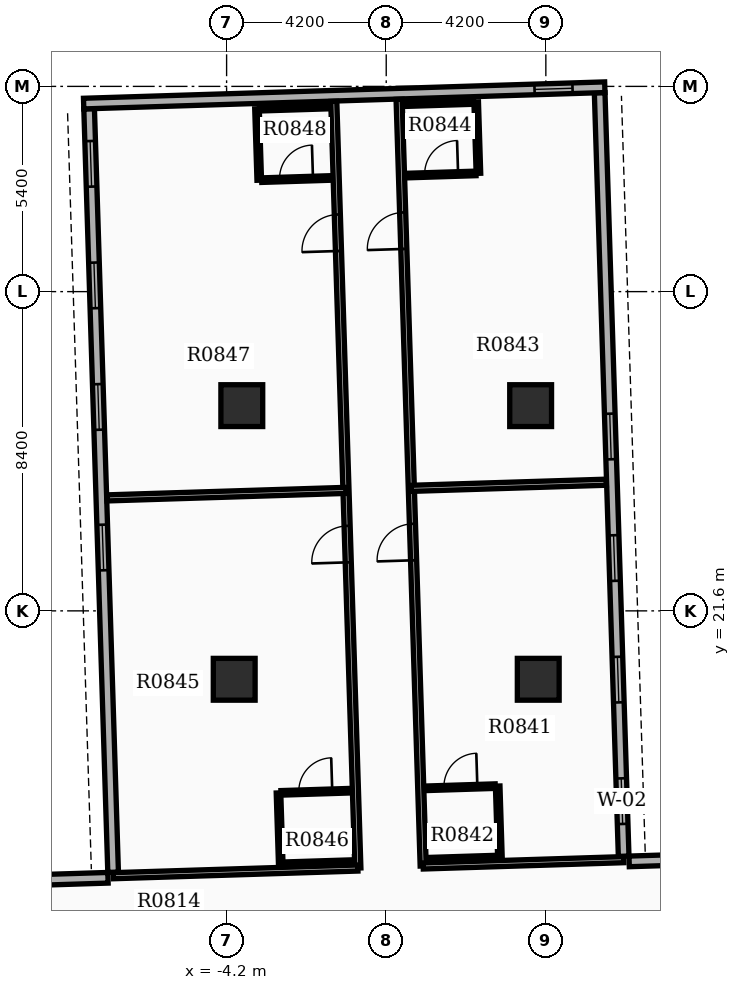
"""IFC4 building model, lengths in metres.
Left out: names, types, materials, properties, quantities, classifications, styles, units other than length and angle.
Written with IfcOpenShell. Run it as: python <this file> out.ifc"""

import sys

from ifc_helpers import new_model, si_unit, direction, frame, frame_2d, origin, origin_2d, place, context, subcontext, project, spatial, rectangle, extrude, element, fill, save


model = new_model("IFC4")
c1 = context("Model", 3, precision=1e-05, world=origin(), true_north=direction((0.0, 1.0)))
c2 = subcontext(c1, "Body", "Model", "MODEL_VIEW")
j1 = project(units=[si_unit("LENGTHUNIT", "METRE"), si_unit("PLANEANGLEUNIT", "RADIAN")], contexts=[c1])
p1 = place(None, origin())
s1 = spatial("IfcSite", under=j1, at=p1, CompositionType="ELEMENT")
p2 = place(p1, origin())
s2 = spatial("IfcBuilding", under=s1, at=p2, CompositionType="ELEMENT")
p3 = place(p2, frame((0.0, 0.0, 56.1)))
s3 = spatial("IfcBuildingStorey", under=s2, at=p3, CompositionType="ELEMENT", Elevation=56.1)
for number, where, z_axis, x_axis in (
    (1, (-4.0, 19.8, 0.0), (0.0, 0.0, 1.0), (1.0, 0.0, 0.0)),
    (2, (4.0, 19.8, 0.0), (0.0, 0.0, 1.0), (1.0, 0.0, 0.0)),
    (3, (-3.8, 27.0, 0.0), (0.0, 0.0, 1.0), (1.0, 0.0, 0.0)),
    (4, (3.8, 27.0, 0.0), (0.0, 0.0, 1.0), (1.0, 0.0, 0.0)),
):
    element("IfcColumn", number, at=place(p3, frame(where, z_axis=z_axis, x_axis=x_axis)), inside=s3, PredefinedType="COLUMN", context=c2, shape_type="SweptSolid", body=[
        extrude(rectangle(XDim=1.1, YDim=1.1, at=origin_2d()), origin(), (0.0, 0.0, 1.0), 3.9),
    ])
p4 = place(p3, frame((6.247, 15.144, 0.0), z_axis=(0.0, 0.0, 1.0), x_axis=(-0.031398187845, 0.999506955354, 0.0)))
e5 = element("IfcWall", 5, at=p4, inside=s3, PredefinedType="STANDARD", context=c2, shape_type="SweptSolid", body=[
    extrude(rectangle(XDim=20.1, YDim=0.28, at=frame_2d((10.05, 0.0))), origin(), (0.0, 0.0, 1.0), 2.91),
])
p5 = place(p4, frame((0.85, 0.0, 0.8)))
e6 = element("IfcOpeningElement", 6, at=p5, cuts=e5, PredefinedType="OPENING", context=c2, shape_type="SweptSolid", body=[
    extrude(rectangle(XDim=1.2, YDim=1.6, at=frame_2d((0.6, 0.8))), frame((0.0, 0.15, 0.0), z_axis=(0.0, -1.0, 0.0), x_axis=(1.0, 0.0, 0.0)), (0.0, 0.0, 1.0), 0.3),
])
p6 = place(p4, frame((4.05, 0.0, 0.8)))
e7 = element("IfcOpeningElement", 7, at=p6, cuts=e5, PredefinedType="OPENING", context=c2, shape_type="SweptSolid", body=[
    extrude(rectangle(XDim=1.2, YDim=1.6, at=frame_2d((0.6, 0.8))), frame((0.0, 0.15, 0.0), z_axis=(0.0, -1.0, 0.0), x_axis=(1.0, 0.0, 0.0)), (0.0, 0.0, 1.0), 0.3),
])
p7 = place(p4, frame((7.25, 0.0, 0.8)))
e8 = element("IfcOpeningElement", 8, at=p7, cuts=e5, PredefinedType="OPENING", context=c2, shape_type="SweptSolid", body=[
    extrude(rectangle(XDim=1.2, YDim=1.6, at=frame_2d((0.6, 0.8))), frame((0.0, 0.15, 0.0), z_axis=(0.0, -1.0, 0.0), x_axis=(1.0, 0.0, 0.0)), (0.0, 0.0, 1.0), 0.3),
])
p8 = place(p4, frame((10.45, 0.0, 0.8)))
e9 = element("IfcOpeningElement", 9, at=p8, cuts=e5, PredefinedType="OPENING", context=c2, shape_type="SweptSolid", body=[
    extrude(rectangle(XDim=1.2, YDim=1.6, at=frame_2d((0.6, 0.8))), frame((0.0, 0.15, 0.0), z_axis=(0.0, -1.0, 0.0), x_axis=(1.0, 0.0, 0.0)), (0.0, 0.0, 1.0), 0.3),
])
p9 = place(p3, frame((-7.817, 34.812, 0.0), z_axis=(0.0, 0.0, 1.0), x_axis=(0.031410322165, -0.999506574096, 0.0)))
e10 = element("IfcWall", 10, at=p9, inside=s3, PredefinedType="STANDARD", context=c2, shape_type="SweptSolid", body=[
    extrude(rectangle(XDim=20.1, YDim=0.28, at=frame_2d((10.05, 0.0))), origin(), (0.0, 0.0, 1.0), 2.91),
])
p10 = place(p9, frame((0.85, 0.0, 0.8)))
e11 = element("IfcOpeningElement", 11, at=p10, cuts=e10, PredefinedType="OPENING", context=c2, shape_type="SweptSolid", body=[
    extrude(rectangle(XDim=1.2, YDim=1.6, at=frame_2d((0.6, 0.8))), frame((0.0, 0.15, 0.0), z_axis=(0.0, -1.0, 0.0), x_axis=(1.0, 0.0, 0.0)), (0.0, 0.0, 1.0), 0.3),
])
p11 = place(p9, frame((4.05, 0.0, 0.8)))
e12 = element("IfcOpeningElement", 12, at=p11, cuts=e10, PredefinedType="OPENING", context=c2, shape_type="SweptSolid", body=[
    extrude(rectangle(XDim=1.2, YDim=1.6, at=frame_2d((0.6, 0.8))), frame((0.0, 0.15, 0.0), z_axis=(0.0, -1.0, 0.0), x_axis=(1.0, 0.0, 0.0)), (0.0, 0.0, 1.0), 0.3),
])
p12 = place(p9, frame((7.25, 0.0, 0.8)))
e13 = element("IfcOpeningElement", 13, at=p12, cuts=e10, PredefinedType="OPENING", context=c2, shape_type="SweptSolid", body=[
    extrude(rectangle(XDim=1.2, YDim=1.6, at=frame_2d((0.6, 0.8))), frame((0.0, 0.15, 0.0), z_axis=(0.0, -1.0, 0.0), x_axis=(1.0, 0.0, 0.0)), (0.0, 0.0, 1.0), 0.3),
])
p13 = place(p9, frame((10.95, 0.0, 0.8)))
e14 = element("IfcOpeningElement", 14, at=p13, cuts=e10, PredefinedType="OPENING", context=c2, shape_type="SweptSolid", body=[
    extrude(rectangle(XDim=1.2, YDim=1.6, at=frame_2d((0.6, 0.8))), frame((0.0, 0.15, 0.0), z_axis=(0.0, -1.0, 0.0), x_axis=(1.0, 0.0, 0.0)), (0.0, 0.0, 1.0), 0.3),
])
p14 = place(p3, frame((5.752, 35.378, 0.0), z_axis=(0.0, 0.0, 1.0), x_axis=(-0.999506679556, -0.031406966164, 0.0)))
e15 = element("IfcWall", 15, at=p14, inside=s3, PredefinedType="STANDARD", context=c2, shape_type="SweptSolid", body=[
    extrude(rectangle(XDim=13.72, YDim=0.28, at=frame_2d((6.86, 0.0))), origin(), (0.0, 0.0, 1.0), 2.91),
])
p15 = place(p14, frame((0.85, 0.0, 0.85)))
e16 = element("IfcOpeningElement", 16, at=p15, cuts=e15, PredefinedType="OPENING", context=c2, shape_type="SweptSolid", body=[
    extrude(rectangle(XDim=1.0, YDim=1.5, at=frame_2d((0.5, 0.75))), frame((0.0, 0.15, 0.0), z_axis=(0.0, -1.0, 0.0), x_axis=(1.0, 0.0, 0.0)), (0.0, 0.0, 1.0), 0.3),
])
p16 = place(p3, frame((12.689, 15.206, 0.0), z_axis=(0.0, 0.0, 1.0), x_axis=(-0.999507262922, -0.031388395416, 0.0)))
e17 = element("IfcWall", 17, at=p16, inside=s3, PredefinedType="STANDARD", context=c2, shape_type="SweptSolid", body=[
    extrude(rectangle(XDim=6.3, YDim=0.28, at=frame_2d((3.15, 0.0))), origin(), (0.0, 0.0, 1.0), 2.91),
])
p17 = place(p3, frame((-13.618, 14.379, 0.0), z_axis=(0.0, 0.0, 1.0), x_axis=(0.999507224741, 0.031389611199, 0.0)))
e18 = element("IfcWall", 18, at=p17, inside=s3, PredefinedType="STANDARD", context=c2, shape_type="SweptSolid", body=[
    extrude(rectangle(XDim=6.3, YDim=0.28, at=frame_2d((3.15, 0.0))), origin(), (0.0, 0.0, 1.0), 2.91),
])
p18 = place(p3, frame((0.973, 14.888, 0.0), z_axis=(0.0, 0.0, 1.0), x_axis=(-0.031416030536, 0.99950639469, 0.0)))
e19 = element("IfcWall", 19, at=p18, inside=s3, PredefinedType="PARTITIONING", context=c2, shape_type="SweptSolid", body=[
    extrude(rectangle(XDim=20.182, YDim=0.16, at=frame_2d((10.091, 0.0))), origin(), (0.0, 0.0, 1.0), 2.9),
])
p19 = place(p18, frame((8.047, 0.0, 0.0)))
e20 = element("IfcOpeningElement", 20, at=p19, cuts=e19, PredefinedType="OPENING", context=c2, shape_type="SweptSolid", body=[
    extrude(rectangle(XDim=0.96, YDim=2.15, at=frame_2d((0.48, 1.075))), frame((0.0, 0.09, 0.0), z_axis=(0.0, -1.0, 0.0), x_axis=(1.0, 0.0, 0.0)), (0.0, 0.0, 1.0), 0.18),
])
p20 = place(p18, frame((16.243, 0.0, 0.0)))
e21 = element("IfcOpeningElement", 21, at=p20, cuts=e19, PredefinedType="OPENING", context=c2, shape_type="SweptSolid", body=[
    extrude(rectangle(XDim=0.96, YDim=2.15, at=frame_2d((0.48, 1.075))), frame((0.0, 0.09, 0.0), z_axis=(0.0, -1.0, 0.0), x_axis=(1.0, 0.0, 0.0)), (0.0, 0.0, 1.0), 0.18),
])
p21 = place(p3, frame((0.973, 14.888, 0.0), z_axis=(0.0, 0.0, 1.0), x_axis=(0.99950701053, 0.031396431354, 0.0)))
e22 = element("IfcWall", 22, at=p21, inside=s3, PredefinedType="PARTITIONING", context=c2, shape_type="SweptSolid", body=[
    extrude(rectangle(XDim=5.28, YDim=0.16, at=frame_2d((2.64, 0.0))), origin(), (0.0, 0.0, 1.0), 2.9),
])
p22 = place(p3, frame((0.661, 24.824, 0.0), z_axis=(0.0, 0.0, 1.0), x_axis=(0.999506957349, 0.031398124315, 0.0)))
e23 = element("IfcWall", 23, at=p22, inside=s3, PredefinedType="PARTITIONING", context=c2, shape_type="SweptSolid", body=[
    extrude(rectangle(XDim=5.132, YDim=0.16, at=frame_2d((2.566, 0.0))), origin(), (0.0, 0.0, 1.0), 2.9),
])
p23 = place(p3, frame((1.049, 16.931, 0.0), z_axis=(0.0, 0.0, 1.0), x_axis=(0.999507353951, 0.031385496622, 0.0)))
e24 = element("IfcWall", 24, at=p23, inside=s3, PredefinedType="PARTITIONING", context=c2, shape_type="SweptSolid", body=[
    extrude(rectangle(XDim=1.82, YDim=0.12, at=frame_2d((0.91, 0.0))), origin(), (0.0, 0.0, 1.0), 2.9),
])
p24 = place(p23, frame((0.47, 0.0, 0.0)))
e25 = element("IfcOpeningElement", 25, at=p24, cuts=e24, PredefinedType="OPENING", context=c2, shape_type="SweptSolid", body=[
    extrude(rectangle(XDim=0.88, YDim=2.1, at=frame_2d((0.44, 1.05))), frame((0.0, 0.07, 0.0), z_axis=(0.0, -1.0, 0.0), x_axis=(1.0, 0.0, 0.0)), (0.0, 0.0, 1.0), 0.14),
])
p25 = place(p3, frame((1.108, 15.052, 0.0), z_axis=(0.0, 0.0, 1.0), x_axis=(0.999507221803, 0.031389704724, 0.0)))
e26 = element("IfcWall", 26, at=p25, inside=s3, PredefinedType="PARTITIONING", context=c2, shape_type="SweptSolid", body=[
    extrude(rectangle(XDim=1.82, YDim=0.12, at=frame_2d((0.91, 0.0))), origin(), (0.0, 0.0, 1.0), 2.9),
])
p26 = place(p3, frame((2.992, 15.111, 0.0), z_axis=(0.0, 0.0, 1.0), x_axis=(-0.031295563454, 0.999510173889, 0.0)))
e27 = element("IfcWall", 27, at=p26, inside=s3, PredefinedType="PARTITIONING", context=c2, shape_type="SweptSolid", body=[
    extrude(rectangle(XDim=1.88, YDim=0.12, at=frame_2d((0.94, 0.0))), origin(), (0.0, 0.0, 1.0), 2.9),
])
p27 = place(p3, frame((0.542, 33.053, 0.0), z_axis=(0.0, 0.0, 1.0), x_axis=(0.999503004171, 0.03152371574, 0.0)))
e28 = element("IfcWall", 28, at=p27, inside=s3, PredefinedType="PARTITIONING", context=c2, shape_type="SweptSolid", body=[
    extrude(rectangle(XDim=1.82, YDim=0.12, at=frame_2d((0.91, 0.0))), origin(), (0.0, 0.0, 1.0), 2.9),
])
p28 = place(p27, frame((0.47, 0.0, 0.0)))
e29 = element("IfcOpeningElement", 29, at=p28, cuts=e28, PredefinedType="OPENING", context=c2, shape_type="SweptSolid", body=[
    extrude(rectangle(XDim=0.88, YDim=2.1, at=frame_2d((0.44, 1.05))), frame((0.0, 0.07, 0.0), z_axis=(0.0, -1.0, 0.0), x_axis=(1.0, 0.0, 0.0)), (0.0, 0.0, 1.0), 0.14),
])
p29 = place(p3, frame((0.483, 34.932, 0.0), z_axis=(0.0, 0.0, 1.0), x_axis=(0.999507221803, 0.031389704724, 0.0)))
e30 = element("IfcWall", 30, at=p29, inside=s3, PredefinedType="PARTITIONING", context=c2, shape_type="SweptSolid", body=[
    extrude(rectangle(XDim=1.82, YDim=0.12, at=frame_2d((0.91, 0.0))), origin(), (0.0, 0.0, 1.0), 2.9),
])
p30 = place(p3, frame((2.426, 33.113, 0.0), z_axis=(0.0, 0.0, 1.0), x_axis=(-0.031295563454, 0.999510173889, 0.0)))
e31 = element("IfcWall", 31, at=p30, inside=s3, PredefinedType="PARTITIONING", context=c2, shape_type="SweptSolid", body=[
    extrude(rectangle(XDim=1.88, YDim=0.12, at=frame_2d((0.94, 0.0))), origin(), (0.0, 0.0, 1.0), 2.9),
])
p31 = place(p3, frame((-0.746, 14.834, 0.0), z_axis=(0.0, 0.0, 1.0), x_axis=(-0.031416030536, 0.99950639469, 0.0)))
e32 = element("IfcWall", 32, at=p31, inside=s3, PredefinedType="PARTITIONING", context=c2, shape_type="SweptSolid", body=[
    extrude(rectangle(XDim=20.182, YDim=0.16, at=frame_2d((10.091, 0.0))), origin(), (0.0, 0.0, 1.0), 2.9),
])
p32 = place(p31, frame((8.047, 0.0, 0.0)))
e33 = element("IfcOpeningElement", 33, at=p32, cuts=e32, PredefinedType="OPENING", context=c2, shape_type="SweptSolid", body=[
    extrude(rectangle(XDim=0.96, YDim=2.15, at=frame_2d((0.48, 1.075))), frame((0.0, 0.09, 0.0), z_axis=(0.0, -1.0, 0.0), x_axis=(1.0, 0.0, 0.0)), (0.0, 0.0, 1.0), 0.18),
])
p33 = place(p31, frame((16.243, 0.0, 0.0)))
e34 = element("IfcOpeningElement", 34, at=p33, cuts=e32, PredefinedType="OPENING", context=c2, shape_type="SweptSolid", body=[
    extrude(rectangle(XDim=0.96, YDim=2.15, at=frame_2d((0.48, 1.075))), frame((0.0, 0.09, 0.0), z_axis=(0.0, -1.0, 0.0), x_axis=(1.0, 0.0, 0.0)), (0.0, 0.0, 1.0), 0.18),
])
p34 = place(p3, frame((-0.746, 14.834, 0.0), z_axis=(0.0, 0.0, 1.0), x_axis=(-0.999506028801, -0.031427669178, 0.0)))
e35 = element("IfcWall", 35, at=p34, inside=s3, PredefinedType="PARTITIONING", context=c2, shape_type="SweptSolid", body=[
    extrude(rectangle(XDim=6.44, YDim=0.16, at=frame_2d((3.22, 0.0))), origin(), (0.0, 0.0, 1.0), 2.9),
])
p35 = place(p3, frame((-1.059, 24.77, 0.0), z_axis=(0.0, 0.0, 1.0), x_axis=(-0.999505962274, -0.031429784908, 0.0)))
e36 = element("IfcWall", 36, at=p35, inside=s3, PredefinedType="PARTITIONING", context=c2, shape_type="SweptSolid", body=[
    extrude(rectangle(XDim=6.292, YDim=0.16, at=frame_2d((3.146, 0.0))), origin(), (0.0, 0.0, 1.0), 2.9),
])
p36 = place(p3, frame((-2.769, 16.811, 0.0), z_axis=(0.0, 0.0, 1.0), x_axis=(0.999507221803, 0.031389704724, 0.0)))
e37 = element("IfcWall", 37, at=p36, inside=s3, PredefinedType="PARTITIONING", context=c2, shape_type="SweptSolid", body=[
    extrude(rectangle(XDim=1.82, YDim=0.12, at=frame_2d((0.91, 0.0))), origin(), (0.0, 0.0, 1.0), 2.9),
])
p37 = place(p36, frame((0.47, 0.0, 0.0)))
e38 = element("IfcOpeningElement", 38, at=p37, cuts=e37, PredefinedType="OPENING", context=c2, shape_type="SweptSolid", body=[
    extrude(rectangle(XDim=0.88, YDim=2.1, at=frame_2d((0.44, 1.05))), frame((0.0, 0.07, 0.0), z_axis=(0.0, -1.0, 0.0), x_axis=(1.0, 0.0, 0.0)), (0.0, 0.0, 1.0), 0.14),
])
p38 = place(p3, frame((-2.71, 14.932, 0.0), z_axis=(0.0, 0.0, 1.0), x_axis=(0.999503004171, 0.03152371574, 0.0)))
e39 = element("IfcWall", 39, at=p38, inside=s3, PredefinedType="PARTITIONING", context=c2, shape_type="SweptSolid", body=[
    extrude(rectangle(XDim=1.82, YDim=0.12, at=frame_2d((0.91, 0.0))), origin(), (0.0, 0.0, 1.0), 2.9),
])
p39 = place(p3, frame((-2.775, 14.93, 0.0), z_axis=(0.0, 0.0, 1.0), x_axis=(-0.031425292588, 0.999506103526, 0.0)))
e40 = element("IfcWall", 40, at=p39, inside=s3, PredefinedType="PARTITIONING", context=c2, shape_type="SweptSolid", body=[
    extrude(rectangle(XDim=1.88, YDim=0.12, at=frame_2d((0.94, 0.0))), origin(), (0.0, 0.0, 1.0), 2.9),
])
p40 = place(p3, frame((-3.276, 32.933, 0.0), z_axis=(0.0, 0.0, 1.0), x_axis=(0.999507221803, 0.031389704724, 0.0)))
e41 = element("IfcWall", 41, at=p40, inside=s3, PredefinedType="PARTITIONING", context=c2, shape_type="SweptSolid", body=[
    extrude(rectangle(XDim=1.82, YDim=0.12, at=frame_2d((0.91, 0.0))), origin(), (0.0, 0.0, 1.0), 2.9),
])
p41 = place(p40, frame((0.47, 0.0, 0.0)))
e42 = element("IfcOpeningElement", 42, at=p41, cuts=e41, PredefinedType="OPENING", context=c2, shape_type="SweptSolid", body=[
    extrude(rectangle(XDim=0.88, YDim=2.1, at=frame_2d((0.44, 1.05))), frame((0.0, 0.07, 0.0), z_axis=(0.0, -1.0, 0.0), x_axis=(1.0, 0.0, 0.0)), (0.0, 0.0, 1.0), 0.14),
])
p42 = place(p3, frame((-3.335, 34.812, 0.0), z_axis=(0.0, 0.0, 1.0), x_axis=(0.999507221803, 0.031389704724, 0.0)))
e43 = element("IfcWall", 43, at=p42, inside=s3, PredefinedType="PARTITIONING", context=c2, shape_type="SweptSolid", body=[
    extrude(rectangle(XDim=1.82, YDim=0.12, at=frame_2d((0.91, 0.0))), origin(), (0.0, 0.0, 1.0), 2.9),
])
p43 = place(p3, frame((-3.341, 32.931, 0.0), z_axis=(0.0, 0.0, 1.0), x_axis=(-0.031429371883, 0.999505975261, 0.0)))
e44 = element("IfcWall", 44, at=p43, inside=s3, PredefinedType="PARTITIONING", context=c2, shape_type="SweptSolid", body=[
    extrude(rectangle(XDim=1.88, YDim=0.12, at=frame_2d((0.94, 0.0))), origin(), (0.0, 0.0, 1.0), 2.9),
])
p44 = place(p5, origin())
e45 = element("IfcWindow", 45, at=p44, inside=s3, PartitioningType="SINGLE_PANEL", PredefinedType="WINDOW", context=c2, shape_type="SweptSolid", body=[
    extrude(rectangle(XDim=1.2, YDim=1.6, at=frame_2d((0.6, 0.8))), frame((0.0, 0.03, 0.0), z_axis=(0.0, -1.0, 0.0), x_axis=(1.0, 0.0, 0.0)), (0.0, 0.0, 1.0), 0.06),
])
fill(e6, e45)
p45 = place(p6, origin())
e46 = element("IfcWindow", 46, at=p45, inside=s3, PartitioningType="SINGLE_PANEL", PredefinedType="WINDOW", context=c2, shape_type="SweptSolid", body=[
    extrude(rectangle(XDim=1.2, YDim=1.6, at=frame_2d((0.6, 0.8))), frame((0.0, 0.03, 0.0), z_axis=(0.0, -1.0, 0.0), x_axis=(1.0, 0.0, 0.0)), (0.0, 0.0, 1.0), 0.06),
])
fill(e7, e46)
p46 = place(p7, origin())
e47 = element("IfcWindow", 47, at=p46, inside=s3, PartitioningType="SINGLE_PANEL", PredefinedType="WINDOW", context=c2, shape_type="SweptSolid", body=[
    extrude(rectangle(XDim=1.2, YDim=1.6, at=frame_2d((0.6, 0.8))), frame((0.0, 0.03, 0.0), z_axis=(0.0, -1.0, 0.0), x_axis=(1.0, 0.0, 0.0)), (0.0, 0.0, 1.0), 0.06),
])
fill(e8, e47)
p47 = place(p8, origin())
e48 = element("IfcWindow", 48, at=p47, inside=s3, PartitioningType="SINGLE_PANEL", PredefinedType="WINDOW", context=c2, shape_type="SweptSolid", body=[
    extrude(rectangle(XDim=1.2, YDim=1.6, at=frame_2d((0.6, 0.8))), frame((0.0, 0.03, 0.0), z_axis=(0.0, -1.0, 0.0), x_axis=(1.0, 0.0, 0.0)), (0.0, 0.0, 1.0), 0.06),
])
fill(e9, e48)
p48 = place(p10, origin())
e49 = element("IfcWindow", 49, at=p48, inside=s3, PartitioningType="SINGLE_PANEL", PredefinedType="WINDOW", context=c2, shape_type="SweptSolid", body=[
    extrude(rectangle(XDim=1.2, YDim=1.6, at=frame_2d((0.6, 0.8))), frame((0.0, 0.03, 0.0), z_axis=(0.0, -1.0, 0.0), x_axis=(1.0, 0.0, 0.0)), (0.0, 0.0, 1.0), 0.06),
])
fill(e11, e49)
p49 = place(p11, origin())
e50 = element("IfcWindow", 50, at=p49, inside=s3, PartitioningType="SINGLE_PANEL", PredefinedType="WINDOW", context=c2, shape_type="SweptSolid", body=[
    extrude(rectangle(XDim=1.2, YDim=1.6, at=frame_2d((0.6, 0.8))), frame((0.0, 0.03, 0.0), z_axis=(0.0, -1.0, 0.0), x_axis=(1.0, 0.0, 0.0)), (0.0, 0.0, 1.0), 0.06),
])
fill(e12, e50)
p50 = place(p12, origin())
e51 = element("IfcWindow", 51, at=p50, inside=s3, PartitioningType="SINGLE_PANEL", PredefinedType="WINDOW", context=c2, shape_type="SweptSolid", body=[
    extrude(rectangle(XDim=1.2, YDim=1.6, at=frame_2d((0.6, 0.8))), frame((0.0, 0.03, 0.0), z_axis=(0.0, -1.0, 0.0), x_axis=(1.0, 0.0, 0.0)), (0.0, 0.0, 1.0), 0.06),
])
fill(e13, e51)
p51 = place(p13, origin())
e52 = element("IfcWindow", 52, at=p51, inside=s3, PartitioningType="SINGLE_PANEL", PredefinedType="WINDOW", context=c2, shape_type="SweptSolid", body=[
    extrude(rectangle(XDim=1.2, YDim=1.6, at=frame_2d((0.6, 0.8))), frame((0.0, 0.03, 0.0), z_axis=(0.0, -1.0, 0.0), x_axis=(1.0, 0.0, 0.0)), (0.0, 0.0, 1.0), 0.06),
])
fill(e14, e52)
p52 = place(p15, origin())
e53 = element("IfcWindow", 53, at=p52, inside=s3, PartitioningType="SINGLE_PANEL", PredefinedType="WINDOW", context=c2, shape_type="SweptSolid", body=[
    extrude(rectangle(XDim=1.0, YDim=1.5, at=frame_2d((0.5, 0.75))), frame((0.0, 0.03, 0.0), z_axis=(0.0, -1.0, 0.0), x_axis=(1.0, 0.0, 0.0)), (0.0, 0.0, 1.0), 0.06),
])
fill(e16, e53)
p53 = place(p19, origin())
e54 = element("IfcDoor", 54, at=p53, inside=s3, OperationType="SINGLE_SWING_LEFT", PredefinedType="DOOR", context=c2, shape_type="SweptSolid", body=[
    extrude(rectangle(XDim=0.96, YDim=2.15, at=frame_2d((0.48, 1.075))), frame((0.0, 0.025, 0.0), z_axis=(0.0, -1.0, 0.0), x_axis=(1.0, 0.0, 0.0)), (0.0, 0.0, 1.0), 0.05),
])
fill(e20, e54)
p54 = place(p24, origin())
e55 = element("IfcDoor", 55, at=p54, inside=s3, OperationType="SINGLE_SWING_RIGHT", PredefinedType="DOOR", context=c2, shape_type="SweptSolid", body=[
    extrude(rectangle(XDim=0.88, YDim=2.1, at=frame_2d((0.44, 1.05))), frame((0.0, 0.025, 0.0), z_axis=(0.0, -1.0, 0.0), x_axis=(1.0, 0.0, 0.0)), (0.0, 0.0, 1.0), 0.05),
])
fill(e25, e55)
p55 = place(p20, origin())
e56 = element("IfcDoor", 56, at=p55, inside=s3, OperationType="SINGLE_SWING_LEFT", PredefinedType="DOOR", context=c2, shape_type="SweptSolid", body=[
    extrude(rectangle(XDim=0.96, YDim=2.15, at=frame_2d((0.48, 1.075))), frame((0.0, 0.025, 0.0), z_axis=(0.0, -1.0, 0.0), x_axis=(1.0, 0.0, 0.0)), (0.0, 0.0, 1.0), 0.05),
])
fill(e21, e56)
p56 = place(p28, origin())
e57 = element("IfcDoor", 57, at=p56, inside=s3, OperationType="SINGLE_SWING_RIGHT", PredefinedType="DOOR", context=c2, shape_type="SweptSolid", body=[
    extrude(rectangle(XDim=0.88, YDim=2.1, at=frame_2d((0.44, 1.05))), frame((0.0, 0.025, 0.0), z_axis=(0.0, -1.0, 0.0), x_axis=(1.0, 0.0, 0.0)), (0.0, 0.0, 1.0), 0.05),
])
fill(e29, e57)
p57 = place(p32, origin())
e58 = element("IfcDoor", 58, at=p57, inside=s3, OperationType="SINGLE_SWING_LEFT", PredefinedType="DOOR", context=c2, shape_type="SweptSolid", body=[
    extrude(rectangle(XDim=0.96, YDim=2.15, at=frame_2d((0.48, 1.075))), frame((0.0, 0.025, 0.0), z_axis=(0.0, -1.0, 0.0), x_axis=(1.0, 0.0, 0.0)), (0.0, 0.0, 1.0), 0.05),
])
fill(e33, e58)
p58 = place(p37, origin())
e59 = element("IfcDoor", 59, at=p58, inside=s3, OperationType="SINGLE_SWING_RIGHT", PredefinedType="DOOR", context=c2, shape_type="SweptSolid", body=[
    extrude(rectangle(XDim=0.88, YDim=2.1, at=frame_2d((0.44, 1.05))), frame((0.0, 0.025, 0.0), z_axis=(0.0, -1.0, 0.0), x_axis=(1.0, 0.0, 0.0)), (0.0, 0.0, 1.0), 0.05),
])
fill(e38, e59)
p59 = place(p33, origin())
e60 = element("IfcDoor", 60, at=p59, inside=s3, OperationType="SINGLE_SWING_LEFT", PredefinedType="DOOR", context=c2, shape_type="SweptSolid", body=[
    extrude(rectangle(XDim=0.96, YDim=2.15, at=frame_2d((0.48, 1.075))), frame((0.0, 0.025, 0.0), z_axis=(0.0, -1.0, 0.0), x_axis=(1.0, 0.0, 0.0)), (0.0, 0.0, 1.0), 0.05),
])
fill(e34, e60)
p60 = place(p41, origin())
e61 = element("IfcDoor", 61, at=p60, inside=s3, OperationType="SINGLE_SWING_RIGHT", PredefinedType="DOOR", context=c2, shape_type="SweptSolid", body=[
    extrude(rectangle(XDim=0.88, YDim=2.1, at=frame_2d((0.44, 1.05))), frame((0.0, 0.025, 0.0), z_axis=(0.0, -1.0, 0.0), x_axis=(1.0, 0.0, 0.0)), (0.0, 0.0, 1.0), 0.05),
])
fill(e42, e61)
save(model, sys.argv[1])
